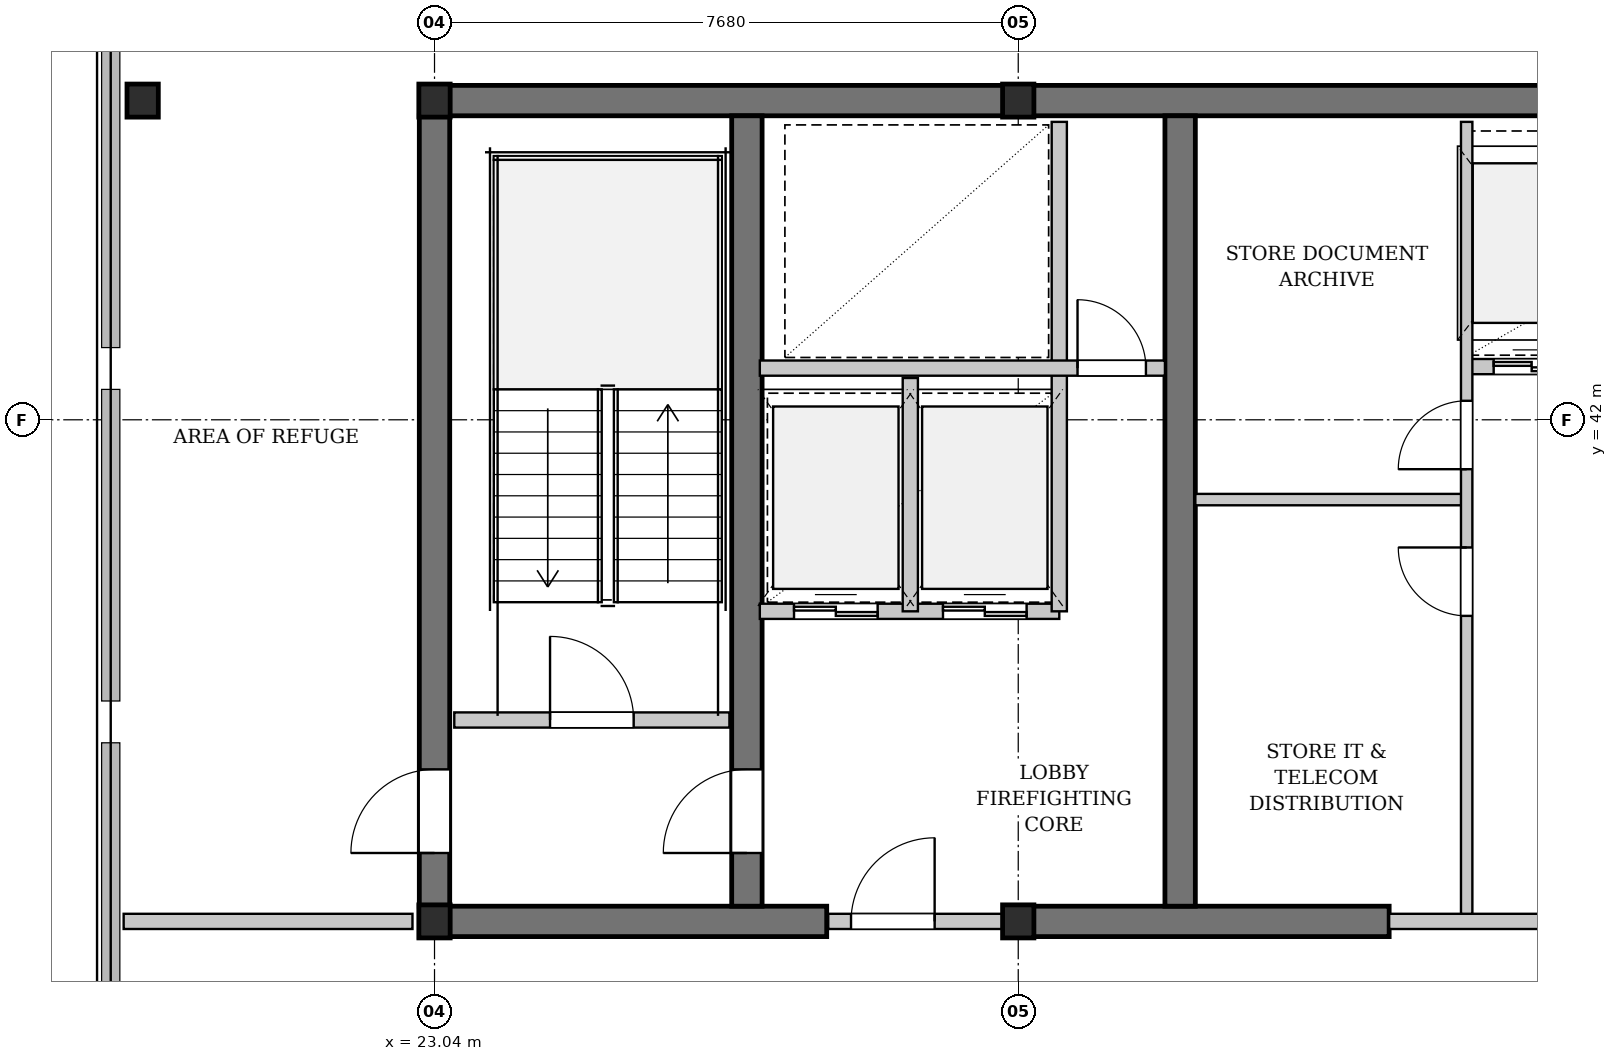
"""IFC4 building model, lengths in metres.
Left out: names, types, materials, properties, quantities, classifications, styles, units other than length and angle.
Written with IfcOpenShell. Run it as: python <this file> out.ifc"""

import sys

from ifc_helpers import new_model, si_unit, direction, frame, frame_2d, origin, origin_2d, place, context, subcontext, project, spatial, rectangle, i_section, extrude, element, fill, save


model = new_model("IFC4")
c1 = context("Model", 3, precision=1e-05, world=origin(), true_north=direction((0.0, 1.0)))
c2 = subcontext(c1, "Body", "Model", "MODEL_VIEW")
j1 = project(units=[si_unit("LENGTHUNIT", "METRE"), si_unit("PLANEANGLEUNIT", "RADIAN")], contexts=[c1])
p1 = place(None, origin())
s1 = spatial("IfcSite", under=j1, at=p1, CompositionType="ELEMENT")
p2 = place(p1, origin())
s2 = spatial("IfcBuilding", under=s1, at=p2, CompositionType="ELEMENT")
p3 = place(p2, frame((0.0, 0.0, 247.4)))
s3 = spatial("IfcBuildingStorey", under=s2, at=p3, CompositionType="ELEMENT", Elevation=247.4)
p4 = place(p3, frame((22.84, 46.2, 0.0), z_axis=(0.0, 0.0, 1.0), x_axis=(1.0, 0.0, 0.0)))
e1 = element("IfcWall", 1, at=p4, inside=s3, PredefinedType="SHEAR", context=c2, shape_type="SweptSolid", body=[
    extrude(rectangle(XDim=31.12, YDim=0.4, at=frame_2d((15.56, 0.0))), origin(), (0.0, 0.0, 1.0), 3.68),
])
p5 = place(p3, frame((22.84, 35.4, 0.0), z_axis=(0.0, 0.0, 1.0), x_axis=(1.0, 0.0, 0.0)))
e2 = element("IfcWall", 2, at=p5, inside=s3, PredefinedType="SHEAR", context=c2, shape_type="SweptSolid", body=[
    extrude(rectangle(XDim=5.36, YDim=0.4, at=frame_2d((2.68, 0.0))), origin(), (0.0, 0.0, 1.0), 3.68),
])
p6 = place(p3, frame((30.72, 35.4, 0.0), z_axis=(0.0, 0.0, 1.0), x_axis=(1.0, 0.0, 0.0)))
e3 = element("IfcWall", 3, at=p6, inside=s3, PredefinedType="SHEAR", context=c2, shape_type="SweptSolid", body=[
    extrude(rectangle(XDim=4.88, YDim=0.4, at=frame_2d((2.44, 0.0))), origin(), (0.0, 0.0, 1.0), 3.68),
])
p7 = place(p3, frame((23.04, 35.6, 0.0), z_axis=(0.0, 0.0, 1.0), x_axis=(0.0, 1.0, 0.0)))
e4 = element("IfcWall", 4, at=p7, inside=s3, PredefinedType="SHEAR", context=c2, shape_type="SweptSolid", body=[
    extrude(rectangle(XDim=10.4, YDim=0.4, at=frame_2d((5.2, 0.0))), origin(), (0.0, 0.0, 1.0), 3.68),
])
p8 = place(p7, frame((0.7, 0.0, 0.0)))
e5 = element("IfcOpeningElement", 5, at=p8, cuts=e4, PredefinedType="OPENING", context=c2, shape_type="SweptSolid", body=[
    extrude(rectangle(XDim=1.1, YDim=2.15, at=frame_2d((0.55, 1.075))), frame((0.0, 0.21, 0.0), z_axis=(0.0, -1.0, 0.0), x_axis=(1.0, 0.0, 0.0)), (0.0, 0.0, 1.0), 0.42),
])
p9 = place(p3, frame((27.15, 35.6, 0.0), z_axis=(0.0, 0.0, 1.0), x_axis=(0.0, 1.0, 0.0)))
e6 = element("IfcWall", 6, at=p9, inside=s3, PredefinedType="SHEAR", context=c2, shape_type="SweptSolid", body=[
    extrude(rectangle(XDim=10.4, YDim=0.4, at=frame_2d((5.2, 0.0))), origin(), (0.0, 0.0, 1.0), 3.68),
])
p10 = place(p9, frame((0.7, 0.0, 0.0)))
e7 = element("IfcOpeningElement", 7, at=p10, cuts=e6, PredefinedType="OPENING", context=c2, shape_type="SweptSolid", body=[
    extrude(rectangle(XDim=1.1, YDim=2.15, at=frame_2d((0.55, 1.075))), frame((0.0, 0.21, 0.0), z_axis=(0.0, -1.0, 0.0), x_axis=(1.0, 0.0, 0.0)), (0.0, 0.0, 1.0), 0.42),
])
p11 = place(p3, frame((32.85, 35.6, 0.0), z_axis=(0.0, 0.0, 1.0), x_axis=(0.0, 1.0, 0.0)))
e8 = element("IfcWall", 8, at=p11, inside=s3, PredefinedType="SHEAR", context=c2, shape_type="SweptSolid", body=[
    extrude(rectangle(XDim=10.4, YDim=0.4, at=frame_2d((5.2, 0.0))), origin(), (0.0, 0.0, 1.0), 3.68),
])
for number, where, z_axis, x_axis in (
    (9, (23.04, 35.4, 0.0), (0.0, 0.0, 1.0), (1.0, 0.0, 0.0)),
    (10, (23.04, 46.2, 0.0), (0.0, 0.0, 1.0), (1.0, 0.0, 0.0)),
    (11, (30.72, 35.4, 0.0), (0.0, 0.0, 1.0), (1.0, 0.0, 0.0)),
    (12, (30.72, 46.2, 0.0), (0.0, 0.0, 1.0), (1.0, 0.0, 0.0)),
    (13, (19.2, 46.2, 0.0), (0.0, 0.0, 1.0), (1.0, 0.0, 0.0)),
):
    element("IfcColumn", number, at=place(p3, frame(where, z_axis=z_axis, x_axis=x_axis)), inside=s3, PredefinedType="COLUMN", context=c2, shape_type="SweptSolid", body=[
        extrude(i_section(OverallWidth=0.412, OverallDepth=0.435, WebThickness=0.036, FlangeThickness=0.058, FilletRadius=0.015, at=origin_2d()), origin(), (0.0, 0.0, 1.0), 3.9),
    ])
p12 = place(p3, frame((23.3, 38.05, 0.0), z_axis=(0.0, 0.0, 1.0), x_axis=(1.0, 0.0, 0.0)))
e14 = element("IfcWall", 14, at=p12, inside=s3, PredefinedType="PARTITIONING", context=c2, shape_type="SweptSolid", body=[
    extrude(rectangle(XDim=3.62, YDim=0.2, at=frame_2d((1.81, 0.0))), origin(), (0.0, 0.0, 1.0), 3.68),
])
p13 = place(p12, frame((1.26, 0.0, 0.0)))
e15 = element("IfcOpeningElement", 15, at=p13, cuts=e14, PredefinedType="OPENING", context=c2, shape_type="SweptSolid", body=[
    extrude(rectangle(XDim=1.1, YDim=2.15, at=frame_2d((0.55, 1.075))), frame((0.0, 0.11, 0.0), z_axis=(0.0, -1.0, 0.0), x_axis=(1.0, 0.0, 0.0)), (0.0, 0.0, 1.0), 0.22),
])
p14 = place(p3, frame((28.22, 35.4, 0.0), z_axis=(0.0, 0.0, 1.0), x_axis=(1.0, 0.0, 0.0)))
e16 = element("IfcWall", 16, at=p14, inside=s3, PredefinedType="PARTITIONING", context=c2, shape_type="SweptSolid", body=[
    extrude(rectangle(XDim=2.5, YDim=0.2, at=frame_2d((1.25, 0.0))), origin(), (0.0, 0.0, 1.0), 2.861),
])
p15 = place(p14, frame((0.3, 0.0, 0.0)))
e17 = element("IfcOpeningElement", 17, at=p15, cuts=e16, PredefinedType="OPENING", context=c2, shape_type="SweptSolid", body=[
    extrude(rectangle(XDim=1.1, YDim=2.15, at=frame_2d((0.55, 1.075))), frame((0.0, 0.11, 0.0), z_axis=(0.0, -1.0, 0.0), x_axis=(1.0, 0.0, 0.0)), (0.0, 0.0, 1.0), 0.22),
])
p16 = place(p3, frame((27.32, 39.48, 0.0), z_axis=(0.0, 0.0, 1.0), x_axis=(1.0, 0.0, 0.0)))
e18 = element("IfcWall", 18, at=p16, inside=s3, PredefinedType="PARTITIONING", context=c2, shape_type="SweptSolid", body=[
    extrude(rectangle(XDim=3.94, YDim=0.2, at=frame_2d((1.97, 0.0))), origin(), (0.0, 0.0, 1.0), 3.68),
])
p17 = place(p16, frame((0.45, 0.0, 0.0)))
e19 = element("IfcOpeningElement", 19, at=p17, cuts=e18, PredefinedType="OPENING", context=c2, shape_type="SweptSolid", body=[
    extrude(rectangle(XDim=1.1, YDim=2.2, at=frame_2d((0.55, 1.1))), frame((0.0, 0.11, 0.0), z_axis=(0.0, -1.0, 0.0), x_axis=(1.0, 0.0, 0.0)), (0.0, 0.0, 1.0), 0.22),
])
p18 = place(p16, frame((2.41, 0.0, 0.0)))
e20 = element("IfcOpeningElement", 20, at=p18, cuts=e18, PredefinedType="OPENING", context=c2, shape_type="SweptSolid", body=[
    extrude(rectangle(XDim=1.1, YDim=2.2, at=frame_2d((0.55, 1.1))), frame((0.0, 0.11, 0.0), z_axis=(0.0, -1.0, 0.0), x_axis=(1.0, 0.0, 0.0)), (0.0, 0.0, 1.0), 0.22),
])
p19 = place(p3, frame((29.3, 39.48, 0.0), z_axis=(0.0, 0.0, 1.0), x_axis=(0.0, 1.0, 0.0)))
e21 = element("IfcWall", 21, at=p19, inside=s3, PredefinedType="PARTITIONING", context=c2, shape_type="SweptSolid", body=[
    extrude(rectangle(XDim=3.07, YDim=0.2, at=frame_2d((1.535, 0.0))), origin(), (0.0, 0.0, 1.0), 3.68),
])
p20 = place(p3, frame((31.26, 39.48, 0.0), z_axis=(0.0, 0.0, 1.0), x_axis=(0.0, 1.0, 0.0)))
e22 = element("IfcWall", 22, at=p20, inside=s3, PredefinedType="PARTITIONING", context=c2, shape_type="SweptSolid", body=[
    extrude(rectangle(XDim=6.44, YDim=0.2, at=frame_2d((3.22, 0.0))), origin(), (0.0, 0.0, 1.0), 3.68),
])
p21 = place(p3, frame((27.32, 42.68, 0.0), z_axis=(0.0, 0.0, 1.0), x_axis=(1.0, 0.0, 0.0)))
e23 = element("IfcWall", 23, at=p21, inside=s3, PredefinedType="PARTITIONING", context=c2, shape_type="SweptSolid", body=[
    extrude(rectangle(XDim=5.33, YDim=0.2, at=frame_2d((2.665, 0.0))), origin(), (0.0, 0.0, 1.0), 3.68),
])
p22 = place(p21, frame((4.18, 0.0, 0.0)))
e24 = element("IfcOpeningElement", 24, at=p22, cuts=e23, PredefinedType="OPENING", context=c2, shape_type="SweptSolid", body=[
    extrude(rectangle(XDim=0.9, YDim=2.15, at=frame_2d((0.45, 1.075))), frame((0.0, 0.11, 0.0), z_axis=(0.0, -1.0, 0.0), x_axis=(1.0, 0.0, 0.0)), (0.0, 0.0, 1.0), 0.22),
])
p23 = place(p3, frame((35.6, 35.4, 0.0), z_axis=(0.0, 0.0, 1.0), x_axis=(1.0, 0.0, 0.0)))
e25 = element("IfcWall", 25, at=p23, inside=s3, PredefinedType="PARTITIONING", context=c2, shape_type="SweptSolid", body=[
    extrude(rectangle(XDim=6.5, YDim=0.2, at=frame_2d((3.25, 0.0))), origin(), (0.0, 0.0, 1.0), 2.861),
])
p24 = place(p23, frame((3.8, 0.0, 0.0)))
e26 = element("IfcOpeningElement", 26, at=p24, cuts=e25, PredefinedType="OPENING", context=c2, shape_type="SweptSolid", body=[
    extrude(rectangle(XDim=1.8, YDim=2.3, at=frame_2d((0.9, 1.15))), frame((0.0, 0.11, 0.0), z_axis=(0.0, -1.0, 0.0), x_axis=(1.0, 0.0, 0.0)), (0.0, 0.0, 1.0), 0.22),
])
p25 = place(p3, frame((36.6, 42.7, 0.0), z_axis=(0.0, 0.0, 1.0), x_axis=(1.0, 0.0, 0.0)))
e27 = element("IfcWall", 27, at=p25, inside=s3, PredefinedType="PARTITIONING", context=c2, shape_type="SweptSolid", body=[
    extrude(rectangle(XDim=5.25, YDim=0.2, at=frame_2d((2.625, 0.0))), origin(), (0.0, 0.0, 1.0), 3.68),
])
p26 = place(p25, frame((0.375, 0.0, 0.0)))
e28 = element("IfcOpeningElement", 28, at=p26, cuts=e27, PredefinedType="OPENING", context=c2, shape_type="SweptSolid", body=[
    extrude(rectangle(XDim=1.0, YDim=2.2, at=frame_2d((0.5, 1.1))), frame((0.0, 0.11, 0.0), z_axis=(0.0, -1.0, 0.0), x_axis=(1.0, 0.0, 0.0)), (0.0, 0.0, 1.0), 0.22),
])
p27 = place(p25, frame((2.125, 0.0, 0.0)))
e29 = element("IfcOpeningElement", 29, at=p27, cuts=e27, PredefinedType="OPENING", context=c2, shape_type="SweptSolid", body=[
    extrude(rectangle(XDim=1.0, YDim=2.2, at=frame_2d((0.5, 1.1))), frame((0.0, 0.11, 0.0), z_axis=(0.0, -1.0, 0.0), x_axis=(1.0, 0.0, 0.0)), (0.0, 0.0, 1.0), 0.22),
])
p28 = place(p25, frame((3.875, 0.0, 0.0)))
e30 = element("IfcOpeningElement", 30, at=p28, cuts=e27, PredefinedType="OPENING", context=c2, shape_type="SweptSolid", body=[
    extrude(rectangle(XDim=1.0, YDim=2.2, at=frame_2d((0.5, 1.1))), frame((0.0, 0.11, 0.0), z_axis=(0.0, -1.0, 0.0), x_axis=(1.0, 0.0, 0.0)), (0.0, 0.0, 1.0), 0.22),
])
p29 = place(p3, frame((33.05, 40.95, 0.0), z_axis=(0.0, 0.0, 1.0), x_axis=(1.0, 0.0, 0.0)))
e31 = element("IfcWall", 31, at=p29, inside=s3, PredefinedType="PARTITIONING", context=c2, shape_type="SweptSolid", body=[
    extrude(rectangle(XDim=3.57, YDim=0.15, at=frame_2d((1.785, 0.0))), origin(), (0.0, 0.0, 1.0), 3.68),
])
p30 = place(p3, frame((36.62, 35.5, 0.0), z_axis=(0.0, 0.0, 1.0), x_axis=(0.0, 1.0, 0.0)))
e32 = element("IfcWall", 32, at=p30, inside=s3, PredefinedType="PARTITIONING", context=c2, shape_type="SweptSolid", body=[
    extrude(rectangle(XDim=10.42, YDim=0.15, at=frame_2d((5.21, 0.0))), origin(), (0.0, 0.0, 1.0), 3.68),
])
p31 = place(p30, frame((3.92, 0.0, 0.0)))
e33 = element("IfcOpeningElement", 33, at=p31, cuts=e32, PredefinedType="OPENING", context=c2, shape_type="SweptSolid", body=[
    extrude(rectangle(XDim=0.9, YDim=2.15, at=frame_2d((0.45, 1.075))), frame((0.0, 0.085, 0.0), z_axis=(0.0, -1.0, 0.0), x_axis=(1.0, 0.0, 0.0)), (0.0, 0.0, 1.0), 0.17),
])
p32 = place(p30, frame((5.85, 0.0, 0.0)))
e34 = element("IfcOpeningElement", 34, at=p32, cuts=e32, PredefinedType="OPENING", context=c2, shape_type="SweptSolid", body=[
    extrude(rectangle(XDim=0.9, YDim=2.15, at=frame_2d((0.45, 1.075))), frame((0.0, 0.085, 0.0), z_axis=(0.0, -1.0, 0.0), x_axis=(1.0, 0.0, 0.0)), (0.0, 0.0, 1.0), 0.17),
])
p33 = place(p3, frame((18.95, 35.4, 0.0), z_axis=(0.0, 0.0, 1.0), x_axis=(1.0, 0.0, 0.0)))
e35 = element("IfcWall", 35, at=p33, inside=s3, PredefinedType="PARTITIONING", context=c2, shape_type="SweptSolid", body=[
    extrude(rectangle(XDim=3.8, YDim=0.2, at=frame_2d((1.9, 0.0))), origin(), (0.0, 0.0, 1.0), 3.68),
])
p34 = place(p13, origin())
e36 = element("IfcDoor", 36, at=p34, inside=s3, OperationType="SINGLE_SWING_LEFT", PredefinedType="DOOR", context=c2, shape_type="SweptSolid", body=[
    extrude(rectangle(XDim=1.1, YDim=2.15, at=frame_2d((0.55, 1.075))), frame((0.0, 0.025, 0.0), z_axis=(0.0, -1.0, 0.0), x_axis=(1.0, 0.0, 0.0)), (0.0, 0.0, 1.0), 0.05),
])
fill(e15, e36)
p35 = place(p15, origin())
e37 = element("IfcDoor", 37, at=p35, inside=s3, OperationType="SINGLE_SWING_RIGHT", PredefinedType="DOOR", context=c2, shape_type="SweptSolid", body=[
    extrude(rectangle(XDim=1.1, YDim=2.15, at=frame_2d((0.55, 1.075))), frame((0.0, 0.025, 0.0), z_axis=(0.0, -1.0, 0.0), x_axis=(1.0, 0.0, 0.0)), (0.0, 0.0, 1.0), 0.05),
])
fill(e17, e37)
p36 = place(p17, origin())
e38 = element("IfcDoor", 38, at=p36, inside=s3, OperationType="DOUBLE_DOOR_SLIDING", PredefinedType="DOOR", context=c2, shape_type="SweptSolid", body=[
    extrude(rectangle(XDim=1.1, YDim=2.2, at=frame_2d((0.55, 1.1))), frame((0.0, 0.025, 0.0), z_axis=(0.0, -1.0, 0.0), x_axis=(1.0, 0.0, 0.0)), (0.0, 0.0, 1.0), 0.05),
])
fill(e19, e38)
p37 = place(p18, origin())
e39 = element("IfcDoor", 39, at=p37, inside=s3, OperationType="DOUBLE_DOOR_SLIDING", PredefinedType="DOOR", context=c2, shape_type="SweptSolid", body=[
    extrude(rectangle(XDim=1.1, YDim=2.2, at=frame_2d((0.55, 1.1))), frame((0.0, 0.025, 0.0), z_axis=(0.0, -1.0, 0.0), x_axis=(1.0, 0.0, 0.0)), (0.0, 0.0, 1.0), 0.05),
])
fill(e20, e39)
p38 = place(p22, origin())
e40 = element("IfcDoor", 40, at=p38, inside=s3, OperationType="SINGLE_SWING_LEFT", PredefinedType="DOOR", context=c2, shape_type="SweptSolid", body=[
    extrude(rectangle(XDim=0.9, YDim=2.15, at=frame_2d((0.45, 1.075))), frame((0.0, 0.025, 0.0), z_axis=(0.0, -1.0, 0.0), x_axis=(1.0, 0.0, 0.0)), (0.0, 0.0, 1.0), 0.05),
])
fill(e24, e40)
p39 = place(p26, origin())
e41 = element("IfcDoor", 41, at=p39, inside=s3, OperationType="DOUBLE_DOOR_SLIDING", PredefinedType="DOOR", context=c2, shape_type="SweptSolid", body=[
    extrude(rectangle(XDim=1.0, YDim=2.2, at=frame_2d((0.5, 1.1))), frame((0.0, 0.025, 0.0), z_axis=(0.0, -1.0, 0.0), x_axis=(1.0, 0.0, 0.0)), (0.0, 0.0, 1.0), 0.05),
])
fill(e28, e41)
p40 = place(p31, origin())
e42 = element("IfcDoor", 42, at=p40, inside=s3, OperationType="SINGLE_SWING_RIGHT", PredefinedType="DOOR", context=c2, shape_type="SweptSolid", body=[
    extrude(rectangle(XDim=0.9, YDim=2.15, at=frame_2d((0.45, 1.075))), frame((0.0, 0.025, 0.0), z_axis=(0.0, -1.0, 0.0), x_axis=(1.0, 0.0, 0.0)), (0.0, 0.0, 1.0), 0.05),
])
fill(e33, e42)
p41 = place(p32, origin())
e43 = element("IfcDoor", 43, at=p41, inside=s3, OperationType="SINGLE_SWING_LEFT", PredefinedType="DOOR", context=c2, shape_type="SweptSolid", body=[
    extrude(rectangle(XDim=0.9, YDim=2.15, at=frame_2d((0.45, 1.075))), frame((0.0, 0.025, 0.0), z_axis=(0.0, -1.0, 0.0), x_axis=(1.0, 0.0, 0.0)), (0.0, 0.0, 1.0), 0.05),
])
fill(e34, e43)
p42 = place(p10, origin())
e44 = element("IfcDoor", 44, at=p42, inside=s3, OperationType="SINGLE_SWING_LEFT", PredefinedType="DOOR", context=c2, shape_type="SweptSolid", body=[
    extrude(rectangle(XDim=1.1, YDim=2.15, at=frame_2d((0.55, 1.075))), frame((0.0, 0.025, 0.0), z_axis=(0.0, -1.0, 0.0), x_axis=(1.0, 0.0, 0.0)), (0.0, 0.0, 1.0), 0.05),
])
fill(e7, e44)
p43 = place(p8, origin())
e45 = element("IfcDoor", 45, at=p43, inside=s3, OperationType="SINGLE_SWING_LEFT", PredefinedType="DOOR", context=c2, shape_type="SweptSolid", body=[
    extrude(rectangle(XDim=1.1, YDim=2.15, at=frame_2d((0.55, 1.075))), frame((0.0, 0.025, 0.0), z_axis=(0.0, -1.0, 0.0), x_axis=(1.0, 0.0, 0.0)), (0.0, 0.0, 1.0), 0.05),
])
fill(e5, e45)
save(model, sys.argv[1])
